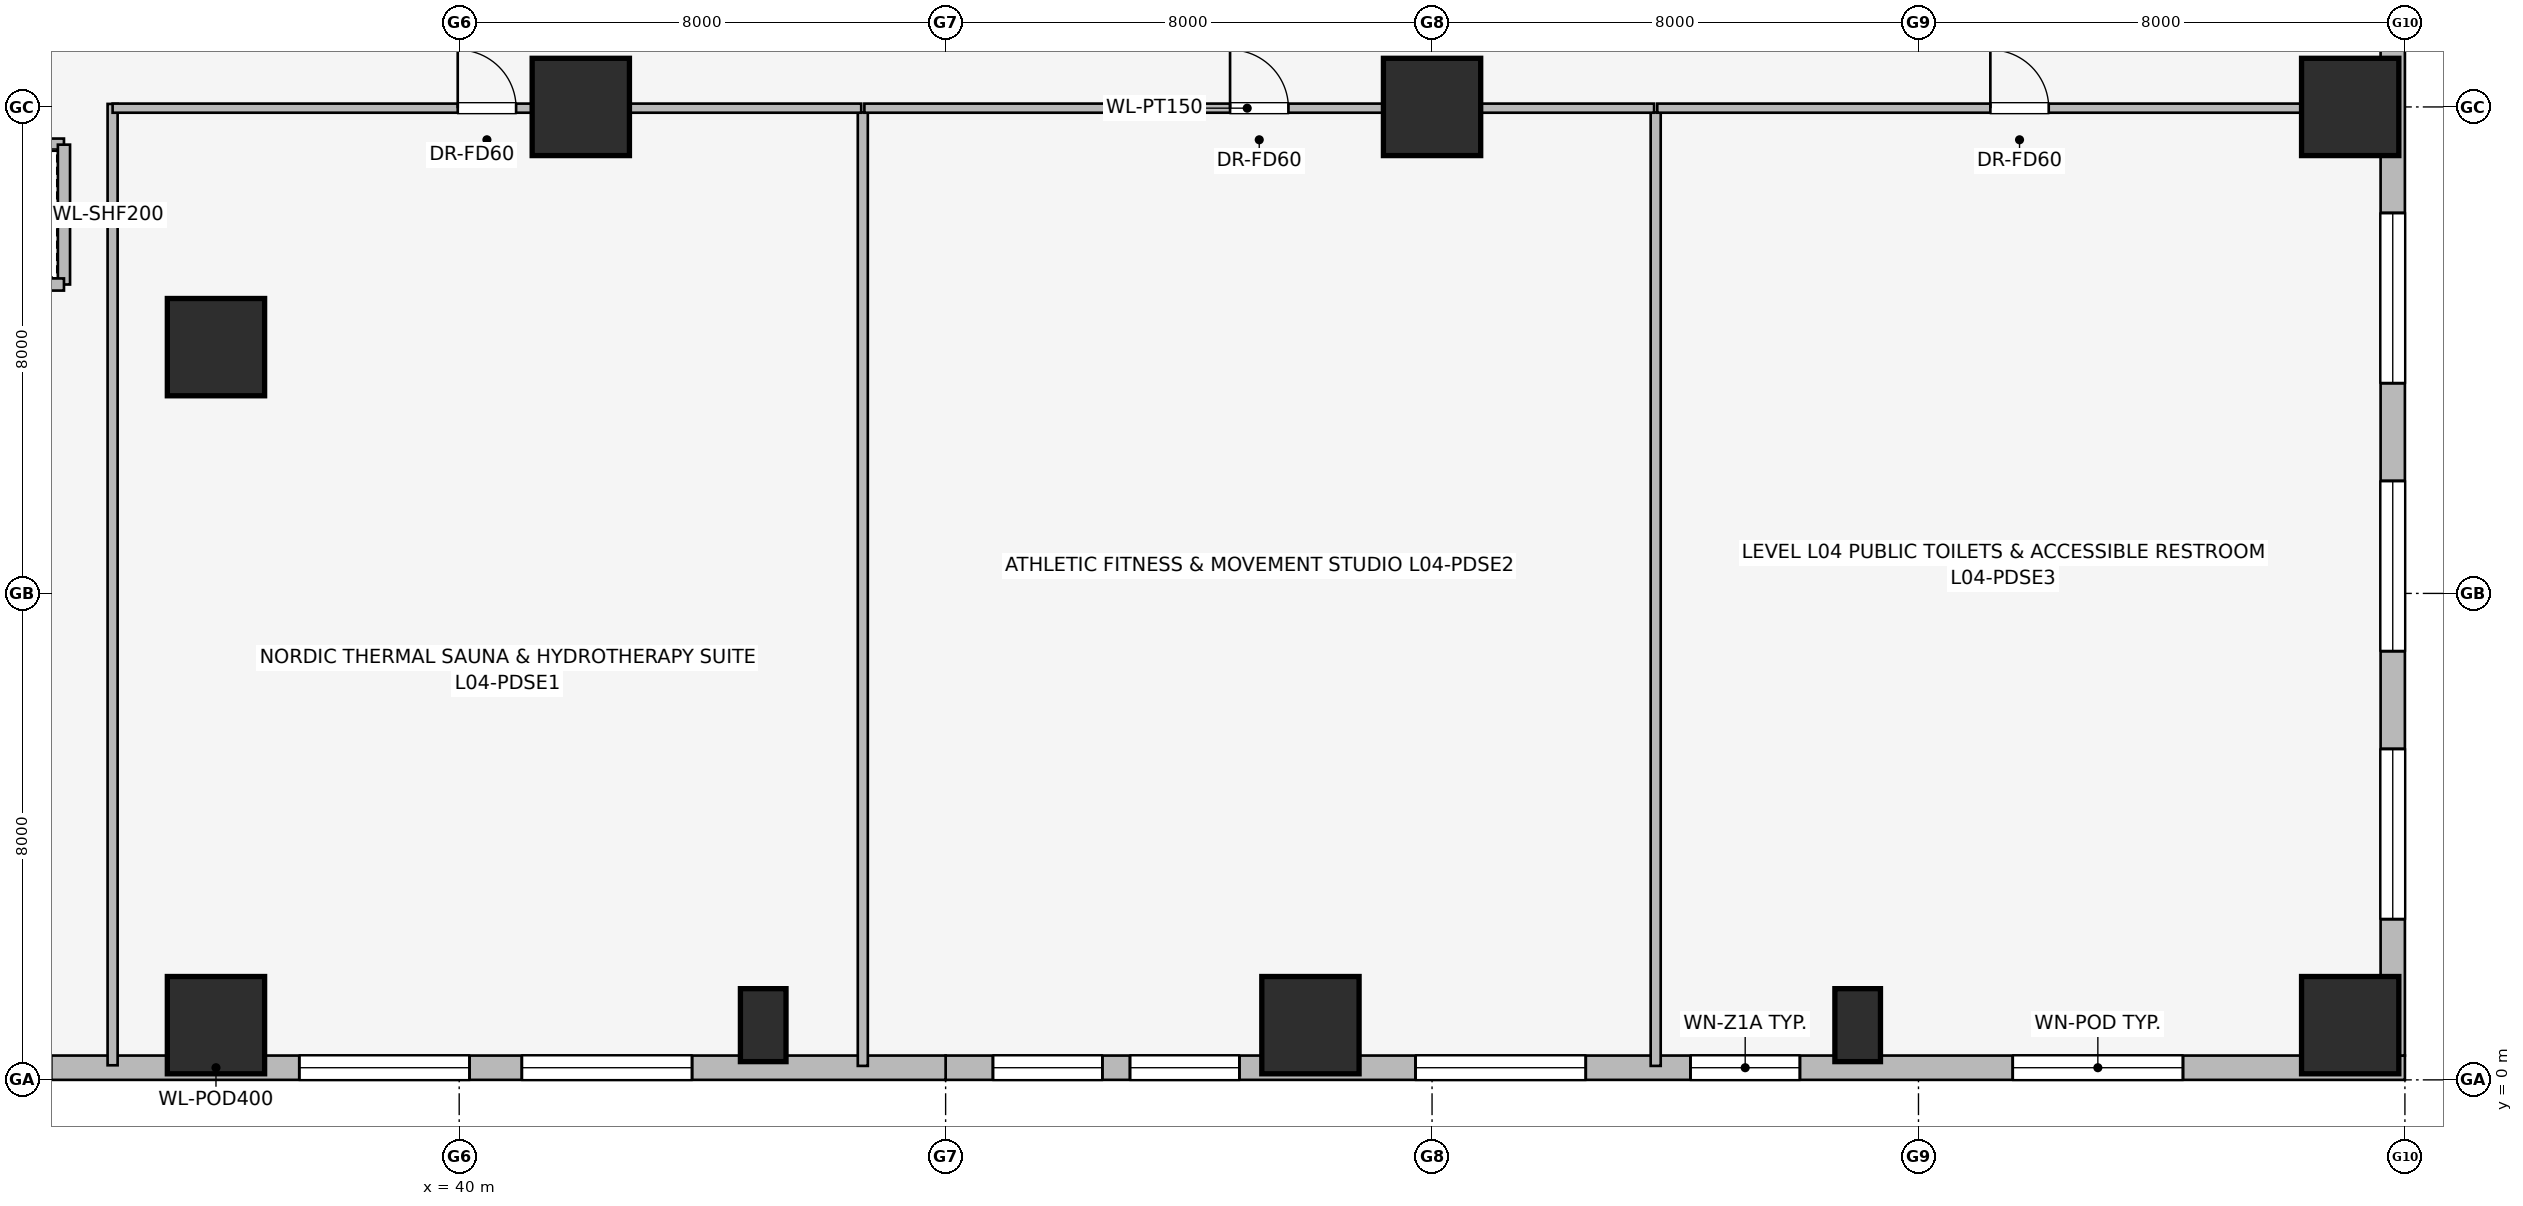
"""IFC4 building model, lengths in metres.
Left out: names, types, materials, properties, quantities, classifications, styles, units other than length and angle.
Written with IfcOpenShell. Run it as: python <this file> out.ifc"""

import sys

from ifc_helpers import new_model, si_unit, direction, frame, frame_2d, origin, origin_2d, place, context, subcontext, project, spatial, rectangle, extrude, element, fill, save


model = new_model("IFC4")
c1 = context("Model", 3, precision=1e-05, world=origin(), true_north=direction((0.0, 1.0)))
c2 = subcontext(c1, "Body", "Model", "MODEL_VIEW")
j1 = project(units=[si_unit("LENGTHUNIT", "METRE"), si_unit("PLANEANGLEUNIT", "RADIAN")], contexts=[c1])
p1 = place(None, origin())
s1 = spatial("IfcSite", under=j1, at=p1, CompositionType="ELEMENT")
p2 = place(p1, origin())
s2 = spatial("IfcBuilding", under=s1, at=p2, CompositionType="ELEMENT")
p3 = place(p2, frame((0.0, 0.0, 16.0)))
s3 = spatial("IfcBuildingStorey", under=s2, at=p3, CompositionType="ELEMENT", Elevation=16.0)
for number, where, z_axis, x_axis in (
    (1, (71.1, 0.9, 0.0), (0.0, 0.0, 1.0), (1.0, 0.0, 0.0)),
    (2, (36.0, 0.9, 0.0), (0.0, 0.0, 1.0), (1.0, 0.0, 0.0)),
    (3, (54.0, 0.9, 0.0), (0.0, 0.0, 1.0), (1.0, 0.0, 0.0)),
    (4, (71.1, 16.0, 0.0), (0.0, 0.0, 1.0), (1.0, 0.0, 0.0)),
    (5, (42.0, 16.0, 0.0), (0.0, 0.0, 1.0), (1.0, 0.0, 0.0)),
    (6, (56.0, 16.0, 0.0), (0.0, 0.0, 1.0), (1.0, 0.0, 0.0)),
    (7, (36.0, 12.05, 0.0), (0.0, 0.0, 1.0), (1.0, 0.0, 0.0)),
):
    element("IfcColumn", number, at=place(p3, frame(where, z_axis=z_axis, x_axis=x_axis)), inside=s3, PredefinedType="COLUMN", context=c2, shape_type="SweptSolid", body=[
        extrude(rectangle(XDim=1.6, YDim=1.6, at=origin_2d()), origin(), (0.0, 0.0, 1.0), 5.0),
    ])
for number, where, z_axis, x_axis in (
    (8, (45.0, 0.9, 0.0), (0.0, 0.0, 1.0), (1.0, 0.0, 0.0)),
    (9, (63.0, 0.9, 0.0), (0.0, 0.0, 1.0), (1.0, 0.0, 0.0)),
):
    element("IfcColumn", number, at=place(p3, frame(where, z_axis=z_axis, x_axis=x_axis)), inside=s3, PredefinedType="PILASTER", context=c2, shape_type="SweptSolid", body=[
        extrude(rectangle(XDim=0.75, YDim=1.2, at=origin_2d()), origin(), (0.0, 0.0, 1.0), 5.0),
    ])
p4 = place(p3, frame((72.0, 0.2, 0.0), z_axis=(0.0, 0.0, 1.0), x_axis=(-1.0, 0.0, 0.0)))
e10 = element("IfcWall", 10, at=p4, inside=s3, PredefinedType="STANDARD", context=c2, shape_type="SweptSolid", body=[
    extrude(rectangle(XDim=24.0, YDim=0.4, at=frame_2d((12.0, 0.0))), origin(), (0.0, 0.0, 1.0), 4.58),
])
p5 = place(p4, frame((3.65, 0.0, 0.75)))
e11 = element("IfcOpeningElement", 11, at=p5, cuts=e10, PredefinedType="OPENING", context=c2, shape_type="SweptSolid", body=[
    extrude(rectangle(XDim=2.8, YDim=1.8, at=frame_2d((1.4, 0.9))), frame((0.0, 0.21, 0.0), z_axis=(0.0, -1.0, 0.0), x_axis=(1.0, 0.0, 0.0)), (0.0, 0.0, 1.0), 0.42),
])
p6 = place(p4, frame((9.95, 0.0, 0.75)))
e12 = element("IfcOpeningElement", 12, at=p6, cuts=e10, PredefinedType="OPENING", context=c2, shape_type="SweptSolid", body=[
    extrude(rectangle(XDim=1.8, YDim=1.5, at=frame_2d((0.9, 0.75))), frame((0.0, 0.21, 0.0), z_axis=(0.0, -1.0, 0.0), x_axis=(1.0, 0.0, 0.0)), (0.0, 0.0, 1.0), 0.42),
])
p7 = place(p4, frame((13.472, 0.0, 0.75)))
e13 = element("IfcOpeningElement", 13, at=p7, cuts=e10, PredefinedType="OPENING", context=c2, shape_type="SweptSolid", body=[
    extrude(rectangle(XDim=2.8, YDim=1.8, at=frame_2d((1.4, 0.9))), frame((0.0, 0.21, 0.0), z_axis=(0.0, -1.0, 0.0), x_axis=(1.0, 0.0, 0.0)), (0.0, 0.0, 1.0), 0.42),
])
p8 = place(p4, frame((19.168, 0.0, 0.75)))
e14 = element("IfcOpeningElement", 14, at=p8, cuts=e10, PredefinedType="OPENING", context=c2, shape_type="SweptSolid", body=[
    extrude(rectangle(XDim=1.8, YDim=1.5, at=frame_2d((0.9, 0.75))), frame((0.0, 0.21, 0.0), z_axis=(0.0, -1.0, 0.0), x_axis=(1.0, 0.0, 0.0)), (0.0, 0.0, 1.0), 0.42),
])
p9 = place(p4, frame((21.422, 0.0, 0.75)))
e15 = element("IfcOpeningElement", 15, at=p9, cuts=e10, PredefinedType="OPENING", context=c2, shape_type="SweptSolid", body=[
    extrude(rectangle(XDim=1.8, YDim=1.5, at=frame_2d((0.9, 0.75))), frame((0.0, 0.21, 0.0), z_axis=(0.0, -1.0, 0.0), x_axis=(1.0, 0.0, 0.0)), (0.0, 0.0, 1.0), 0.42),
])
p10 = place(p3, frame((48.0, 0.2, 0.0), z_axis=(0.0, 0.0, 1.0), x_axis=(-1.0, 0.0, 0.0)))
e16 = element("IfcWall", 16, at=p10, inside=s3, PredefinedType="STANDARD", context=c2, shape_type="SweptSolid", body=[
    extrude(rectangle(XDim=24.0, YDim=0.4, at=frame_2d((12.0, 0.0))), origin(), (0.0, 0.0, 1.0), 4.58),
])
p11 = place(p10, frame((4.17, 0.0, 0.75)))
e17 = element("IfcOpeningElement", 17, at=p11, cuts=e16, PredefinedType="OPENING", context=c2, shape_type="SweptSolid", body=[
    extrude(rectangle(XDim=2.8, YDim=1.8, at=frame_2d((1.4, 0.9))), frame((0.0, 0.21, 0.0), z_axis=(0.0, -1.0, 0.0), x_axis=(1.0, 0.0, 0.0)), (0.0, 0.0, 1.0), 0.42),
])
p12 = place(p10, frame((7.83, 0.0, 0.75)))
e18 = element("IfcOpeningElement", 18, at=p12, cuts=e16, PredefinedType="OPENING", context=c2, shape_type="SweptSolid", body=[
    extrude(rectangle(XDim=2.8, YDim=1.8, at=frame_2d((1.4, 0.9))), frame((0.0, 0.21, 0.0), z_axis=(0.0, -1.0, 0.0), x_axis=(1.0, 0.0, 0.0)), (0.0, 0.0, 1.0), 0.42),
])
p13 = place(p10, frame((14.712, 0.0, 0.75)))
e19 = element("IfcOpeningElement", 19, at=p13, cuts=e16, PredefinedType="OPENING", context=c2, shape_type="SweptSolid", body=[
    extrude(rectangle(XDim=1.8, YDim=1.5, at=frame_2d((0.9, 0.75))), frame((0.0, 0.21, 0.0), z_axis=(0.0, -1.0, 0.0), x_axis=(1.0, 0.0, 0.0)), (0.0, 0.0, 1.0), 0.42),
])
p14 = place(p10, frame((17.811, 0.0, 0.75)))
e20 = element("IfcOpeningElement", 20, at=p14, cuts=e16, PredefinedType="OPENING", context=c2, shape_type="SweptSolid", body=[
    extrude(rectangle(XDim=1.8, YDim=1.5, at=frame_2d((0.9, 0.75))), frame((0.0, 0.21, 0.0), z_axis=(0.0, -1.0, 0.0), x_axis=(1.0, 0.0, 0.0)), (0.0, 0.0, 1.0), 0.42),
])
p15 = place(p10, frame((22.07, 0.0, 0.75)))
e21 = element("IfcOpeningElement", 21, at=p15, cuts=e16, PredefinedType="OPENING", context=c2, shape_type="SweptSolid", body=[
    extrude(rectangle(XDim=1.05, YDim=1.4, at=frame_2d((0.525, 0.7))), frame((0.0, 0.21, 0.0), z_axis=(0.0, -1.0, 0.0), x_axis=(1.0, 0.0, 0.0)), (0.0, 0.0, 1.0), 0.42),
])
p16 = place(p3, frame((71.8, 17.0, 0.0), z_axis=(0.0, 0.0, 1.0), x_axis=(0.0, -1.0, 0.0)))
e22 = element("IfcWall", 22, at=p16, inside=s3, PredefinedType="STANDARD", context=c2, shape_type="SweptSolid", body=[
    extrude(rectangle(XDim=16.6, YDim=0.4, at=frame_2d((8.3, 0.0))), origin(), (0.0, 0.0, 1.0), 4.58),
])
p17 = place(p16, frame((2.743, 0.0, 0.75)))
e23 = element("IfcOpeningElement", 23, at=p17, cuts=e22, PredefinedType="OPENING", context=c2, shape_type="SweptSolid", body=[
    extrude(rectangle(XDim=2.8, YDim=1.8, at=frame_2d((1.4, 0.9))), frame((0.0, 0.21, 0.0), z_axis=(0.0, -1.0, 0.0), x_axis=(1.0, 0.0, 0.0)), (0.0, 0.0, 1.0), 0.42),
])
p18 = place(p16, frame((7.15, 0.0, 0.75)))
e24 = element("IfcOpeningElement", 24, at=p18, cuts=e22, PredefinedType="OPENING", context=c2, shape_type="SweptSolid", body=[
    extrude(rectangle(XDim=2.8, YDim=1.8, at=frame_2d((1.4, 0.9))), frame((0.0, 0.21, 0.0), z_axis=(0.0, -1.0, 0.0), x_axis=(1.0, 0.0, 0.0)), (0.0, 0.0, 1.0), 0.42),
])
p19 = place(p16, frame((11.557, 0.0, 0.75)))
e25 = element("IfcOpeningElement", 25, at=p19, cuts=e22, PredefinedType="OPENING", context=c2, shape_type="SweptSolid", body=[
    extrude(rectangle(XDim=2.8, YDim=1.8, at=frame_2d((1.4, 0.9))), frame((0.0, 0.21, 0.0), z_axis=(0.0, -1.0, 0.0), x_axis=(1.0, 0.0, 0.0)), (0.0, 0.0, 1.0), 0.42),
])
p20 = place(p3, frame((33.5, 15.38, 0.0), z_axis=(0.0, 0.0, 1.0), x_axis=(-1.0, 0.0, 0.0)))
e26 = element("IfcWall", 26, at=p20, inside=s3, PredefinedType="PARTITIONING", context=c2, shape_type="SweptSolid", body=[
    extrude(rectangle(XDim=2.82, YDim=0.2, at=frame_2d((1.41, 0.0))), origin(), (0.0, 0.0, 1.0), 4.58),
])
p21 = place(p20, frame((0.8, 0.0, 0.0)))
e27 = element("IfcOpeningElement", 27, at=p21, cuts=e26, PredefinedType="OPENING", context=c2, shape_type="SweptSolid", body=[
    extrude(rectangle(XDim=1.2, YDim=2.2, at=frame_2d((0.6, 1.1))), frame((0.0, 0.11, 0.0), z_axis=(0.0, -1.0, 0.0), x_axis=(1.0, 0.0, 0.0)), (0.0, 0.0, 1.0), 0.22),
])
p22 = place(p3, frame((33.5, 13.08, 0.0), z_axis=(0.0, 0.0, 1.0), x_axis=(0.0, 1.0, 0.0)))
e28 = element("IfcWall", 28, at=p22, inside=s3, PredefinedType="PARTITIONING", context=c2, shape_type="SweptSolid", body=[
    extrude(rectangle(XDim=2.3, YDim=0.2, at=frame_2d((1.15, 0.0))), origin(), (0.0, 0.0, 1.0), 4.58),
])
p23 = place(p3, frame((30.879, 13.08, 0.0), z_axis=(0.0, 0.0, 1.0), x_axis=(1.0, 0.0, 0.0)))
e29 = element("IfcWall", 29, at=p23, inside=s3, PredefinedType="PARTITIONING", context=c2, shape_type="SweptSolid", body=[
    extrude(rectangle(XDim=2.621, YDim=0.2, at=frame_2d((1.311, 0.0))), origin(), (0.0, 0.0, 1.0), 4.58),
])
p24 = place(p3, frame((34.3, 0.24, 0.0), z_axis=(0.0, 0.0, 1.0), x_axis=(0.0, 1.0, 0.0)))
e30 = element("IfcWall", 30, at=p24, inside=s3, PredefinedType="PARTITIONING", context=c2, shape_type="SweptSolid", body=[
    extrude(rectangle(XDim=15.81, YDim=0.165, at=frame_2d((7.905, 0.0))), origin(), (0.0, 0.0, 1.0), 4.58),
])
p25 = place(p3, frame((46.638, 0.23, 0.0), z_axis=(0.0, 0.0, 1.0), x_axis=(0.0, 1.0, 0.0)))
e31 = element("IfcWall", 31, at=p25, inside=s3, PredefinedType="PARTITIONING", context=c2, shape_type="SweptSolid", body=[
    extrude(rectangle(XDim=15.68, YDim=0.165, at=frame_2d((7.84, 0.0))), origin(), (0.0, 0.0, 1.0), 3.972),
])
p26 = place(p3, frame((59.678, 0.23, 0.0), z_axis=(0.0, 0.0, 1.0), x_axis=(0.0, 1.0, 0.0)))
e32 = element("IfcWall", 32, at=p26, inside=s3, PredefinedType="PARTITIONING", context=c2, shape_type="SweptSolid", body=[
    extrude(rectangle(XDim=15.68, YDim=0.165, at=frame_2d((7.84, 0.0))), origin(), (0.0, 0.0, 1.0), 4.58),
])
p27 = place(p3, frame((34.3, 15.98, 0.0), z_axis=(0.0, 0.0, 1.0), x_axis=(1.0, 0.0, 0.0)))
e33 = element("IfcWall", 33, at=p27, inside=s3, PredefinedType="PARTITIONING", context=c2, shape_type="SweptSolid", body=[
    extrude(rectangle(XDim=12.312, YDim=0.15, at=frame_2d((6.156, 0.0))), origin(), (0.0, 0.0, 1.0), 3.632),
])
p28 = place(p27, frame((5.676, 0.0, 0.0)))
e34 = element("IfcOpeningElement", 34, at=p28, cuts=e33, PredefinedType="OPENING", context=c2, shape_type="SweptSolid", body=[
    extrude(rectangle(XDim=0.96, YDim=2.0, at=frame_2d((0.48, 1.0))), frame((0.0, 0.085, 0.0), z_axis=(0.0, -1.0, 0.0), x_axis=(1.0, 0.0, 0.0)), (0.0, 0.0, 1.0), 0.17),
])
p29 = place(p3, frame((46.664, 15.98, 0.0), z_axis=(0.0, 0.0, 1.0), x_axis=(1.0, 0.0, 0.0)))
e35 = element("IfcWall", 35, at=p29, inside=s3, PredefinedType="PARTITIONING", context=c2, shape_type="SweptSolid", body=[
    extrude(rectangle(XDim=12.988, YDim=0.15, at=frame_2d((6.494, 0.0))), origin(), (0.0, 0.0, 1.0), 3.632),
])
p30 = place(p29, frame((6.014, 0.0, 0.0)))
e36 = element("IfcOpeningElement", 36, at=p30, cuts=e35, PredefinedType="OPENING", context=c2, shape_type="SweptSolid", body=[
    extrude(rectangle(XDim=0.96, YDim=2.0, at=frame_2d((0.48, 1.0))), frame((0.0, 0.085, 0.0), z_axis=(0.0, -1.0, 0.0), x_axis=(1.0, 0.0, 0.0)), (0.0, 0.0, 1.0), 0.17),
])
p31 = place(p3, frame((59.704, 15.98, 0.0), z_axis=(0.0, 0.0, 1.0), x_axis=(1.0, 0.0, 0.0)))
e37 = element("IfcWall", 37, at=p31, inside=s3, PredefinedType="PARTITIONING", context=c2, shape_type="SweptSolid", body=[
    extrude(rectangle(XDim=11.916, YDim=0.15, at=frame_2d((5.958, 0.0))), origin(), (0.0, 0.0, 1.0), 3.632),
])
p32 = place(p31, frame((5.478, 0.0, 0.0)))
e38 = element("IfcOpeningElement", 38, at=p32, cuts=e37, PredefinedType="OPENING", context=c2, shape_type="SweptSolid", body=[
    extrude(rectangle(XDim=0.96, YDim=2.0, at=frame_2d((0.48, 1.0))), frame((0.0, 0.085, 0.0), z_axis=(0.0, -1.0, 0.0), x_axis=(1.0, 0.0, 0.0)), (0.0, 0.0, 1.0), 0.17),
])
p33 = place(p5, origin())
e39 = element("IfcWindow", 39, at=p33, inside=s3, PartitioningType="SINGLE_PANEL", PredefinedType="WINDOW", context=c2, shape_type="SweptSolid", body=[
    extrude(rectangle(XDim=2.8, YDim=1.8, at=frame_2d((1.4, 0.9))), frame((0.0, 0.03, 0.0), z_axis=(0.0, -1.0, 0.0), x_axis=(1.0, 0.0, 0.0)), (0.0, 0.0, 1.0), 0.06),
])
fill(e11, e39)
p34 = place(p6, origin())
e40 = element("IfcWindow", 40, at=p34, inside=s3, PartitioningType="SINGLE_PANEL", PredefinedType="WINDOW", context=c2, shape_type="SweptSolid", body=[
    extrude(rectangle(XDim=1.8, YDim=1.5, at=frame_2d((0.9, 0.75))), frame((0.0, 0.03, 0.0), z_axis=(0.0, -1.0, 0.0), x_axis=(1.0, 0.0, 0.0)), (0.0, 0.0, 1.0), 0.06),
])
fill(e12, e40)
p35 = place(p7, origin())
e41 = element("IfcWindow", 41, at=p35, inside=s3, PartitioningType="SINGLE_PANEL", PredefinedType="WINDOW", context=c2, shape_type="SweptSolid", body=[
    extrude(rectangle(XDim=2.8, YDim=1.8, at=frame_2d((1.4, 0.9))), frame((0.0, 0.03, 0.0), z_axis=(0.0, -1.0, 0.0), x_axis=(1.0, 0.0, 0.0)), (0.0, 0.0, 1.0), 0.06),
])
fill(e13, e41)
p36 = place(p8, origin())
e42 = element("IfcWindow", 42, at=p36, inside=s3, PartitioningType="SINGLE_PANEL", PredefinedType="WINDOW", context=c2, shape_type="SweptSolid", body=[
    extrude(rectangle(XDim=1.8, YDim=1.5, at=frame_2d((0.9, 0.75))), frame((0.0, 0.03, 0.0), z_axis=(0.0, -1.0, 0.0), x_axis=(1.0, 0.0, 0.0)), (0.0, 0.0, 1.0), 0.06),
])
fill(e14, e42)
p37 = place(p9, origin())
e43 = element("IfcWindow", 43, at=p37, inside=s3, PartitioningType="SINGLE_PANEL", PredefinedType="WINDOW", context=c2, shape_type="SweptSolid", body=[
    extrude(rectangle(XDim=1.8, YDim=1.5, at=frame_2d((0.9, 0.75))), frame((0.0, 0.03, 0.0), z_axis=(0.0, -1.0, 0.0), x_axis=(1.0, 0.0, 0.0)), (0.0, 0.0, 1.0), 0.06),
])
fill(e15, e43)
p38 = place(p11, origin())
e44 = element("IfcWindow", 44, at=p38, inside=s3, PartitioningType="SINGLE_PANEL", PredefinedType="WINDOW", context=c2, shape_type="SweptSolid", body=[
    extrude(rectangle(XDim=2.8, YDim=1.8, at=frame_2d((1.4, 0.9))), frame((0.0, 0.03, 0.0), z_axis=(0.0, -1.0, 0.0), x_axis=(1.0, 0.0, 0.0)), (0.0, 0.0, 1.0), 0.06),
])
fill(e17, e44)
p39 = place(p12, origin())
e45 = element("IfcWindow", 45, at=p39, inside=s3, PartitioningType="SINGLE_PANEL", PredefinedType="WINDOW", context=c2, shape_type="SweptSolid", body=[
    extrude(rectangle(XDim=2.8, YDim=1.8, at=frame_2d((1.4, 0.9))), frame((0.0, 0.03, 0.0), z_axis=(0.0, -1.0, 0.0), x_axis=(1.0, 0.0, 0.0)), (0.0, 0.0, 1.0), 0.06),
])
fill(e18, e45)
p40 = place(p17, origin())
e46 = element("IfcWindow", 46, at=p40, inside=s3, PartitioningType="SINGLE_PANEL", PredefinedType="WINDOW", context=c2, shape_type="SweptSolid", body=[
    extrude(rectangle(XDim=2.8, YDim=1.8, at=frame_2d((1.4, 0.9))), frame((0.0, 0.03, 0.0), z_axis=(0.0, -1.0, 0.0), x_axis=(1.0, 0.0, 0.0)), (0.0, 0.0, 1.0), 0.06),
])
fill(e23, e46)
p41 = place(p18, origin())
e47 = element("IfcWindow", 47, at=p41, inside=s3, PartitioningType="SINGLE_PANEL", PredefinedType="WINDOW", context=c2, shape_type="SweptSolid", body=[
    extrude(rectangle(XDim=2.8, YDim=1.8, at=frame_2d((1.4, 0.9))), frame((0.0, 0.03, 0.0), z_axis=(0.0, -1.0, 0.0), x_axis=(1.0, 0.0, 0.0)), (0.0, 0.0, 1.0), 0.06),
])
fill(e24, e47)
p42 = place(p19, origin())
e48 = element("IfcWindow", 48, at=p42, inside=s3, PartitioningType="SINGLE_PANEL", PredefinedType="WINDOW", context=c2, shape_type="SweptSolid", body=[
    extrude(rectangle(XDim=2.8, YDim=1.8, at=frame_2d((1.4, 0.9))), frame((0.0, 0.03, 0.0), z_axis=(0.0, -1.0, 0.0), x_axis=(1.0, 0.0, 0.0)), (0.0, 0.0, 1.0), 0.06),
])
fill(e25, e48)
p43 = place(p28, origin())
e49 = element("IfcDoor", 49, at=p43, inside=s3, OperationType="SINGLE_SWING_LEFT", PredefinedType="DOOR", context=c2, shape_type="SweptSolid", body=[
    extrude(rectangle(XDim=0.96, YDim=2.0, at=frame_2d((0.48, 1.0))), frame((0.0, 0.025, 0.0), z_axis=(0.0, -1.0, 0.0), x_axis=(1.0, 0.0, 0.0)), (0.0, 0.0, 1.0), 0.05),
])
fill(e34, e49)
p44 = place(p30, origin())
e50 = element("IfcDoor", 50, at=p44, inside=s3, OperationType="SINGLE_SWING_LEFT", PredefinedType="DOOR", context=c2, shape_type="SweptSolid", body=[
    extrude(rectangle(XDim=0.96, YDim=2.0, at=frame_2d((0.48, 1.0))), frame((0.0, 0.025, 0.0), z_axis=(0.0, -1.0, 0.0), x_axis=(1.0, 0.0, 0.0)), (0.0, 0.0, 1.0), 0.05),
])
fill(e36, e50)
p45 = place(p32, origin())
e51 = element("IfcDoor", 51, at=p45, inside=s3, OperationType="SINGLE_SWING_LEFT", PredefinedType="DOOR", context=c2, shape_type="SweptSolid", body=[
    extrude(rectangle(XDim=0.96, YDim=2.0, at=frame_2d((0.48, 1.0))), frame((0.0, 0.025, 0.0), z_axis=(0.0, -1.0, 0.0), x_axis=(1.0, 0.0, 0.0)), (0.0, 0.0, 1.0), 0.05),
])
fill(e38, e51)
save(model, sys.argv[1])
